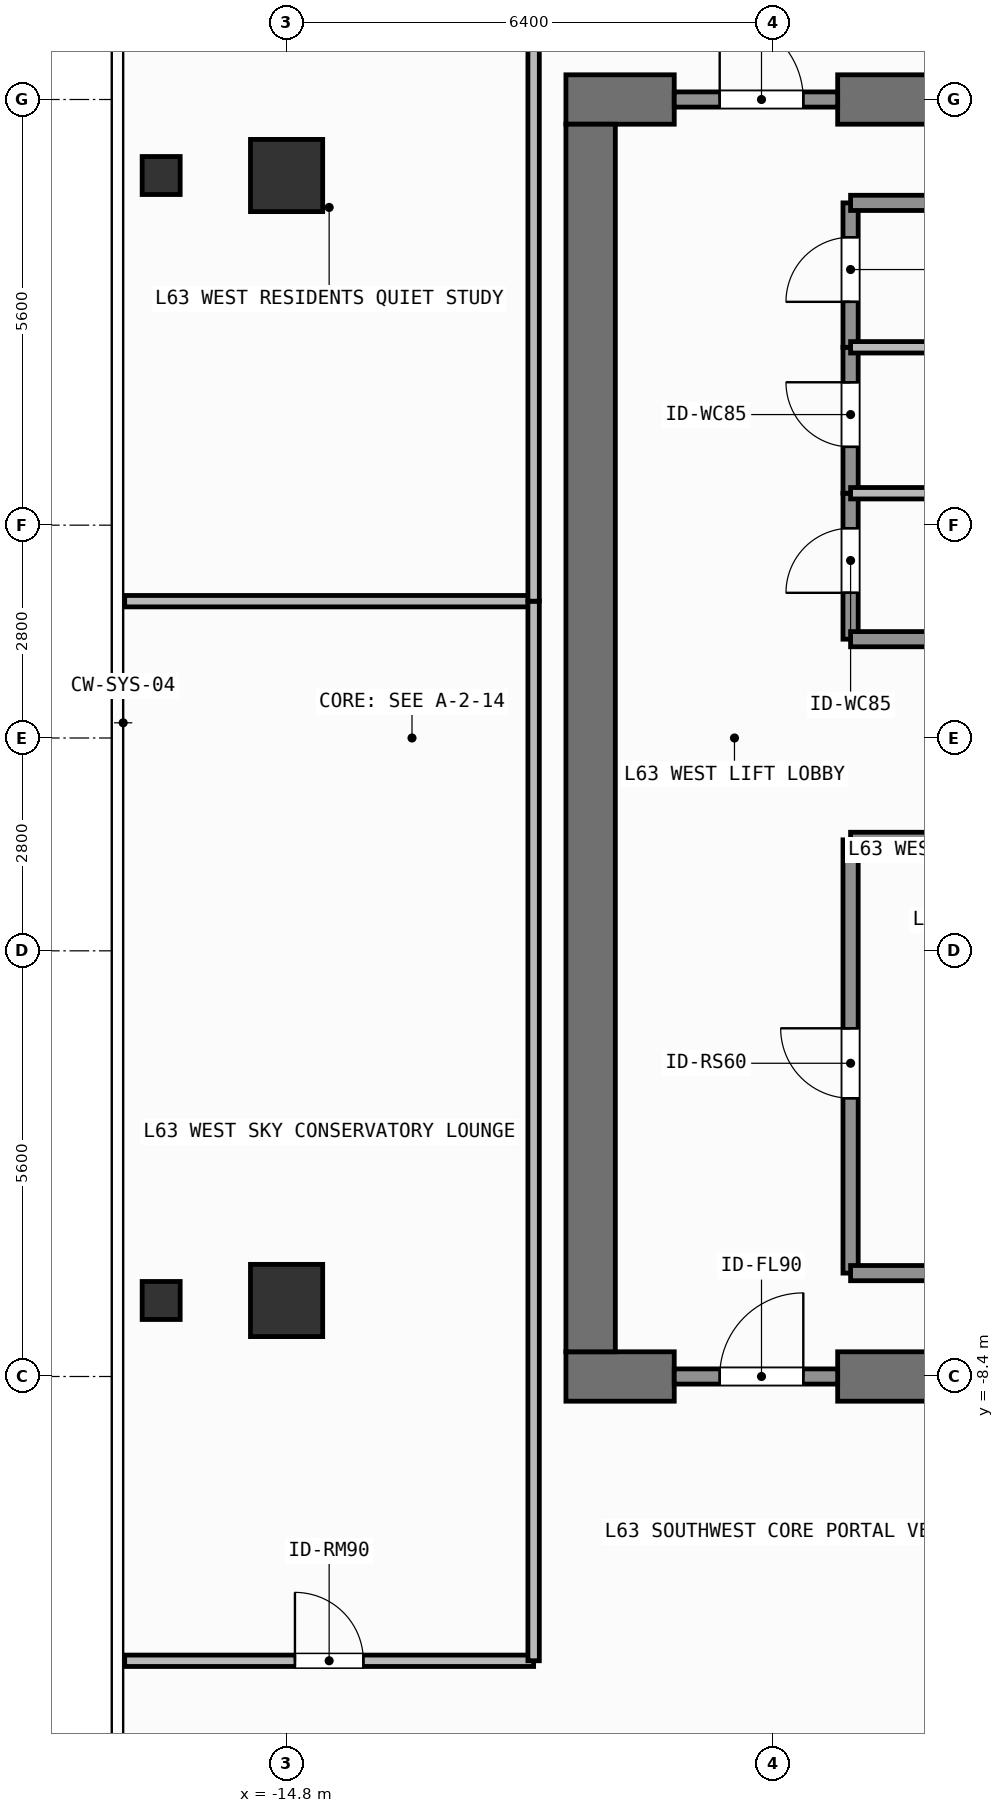
"""IFC4 building model, lengths in metres.
Left out: names, types, materials, properties, quantities, classifications, styles, units other than length and angle.
Written with IfcOpenShell. Run it as: python <this file> out.ifc"""

import sys

from ifc_helpers import new_model, si_unit, direction, frame, frame_2d, origin, origin_2d, place, context, subcontext, project, spatial, rectangle, hollow_rectangle, extrude, element, fill, save


model = new_model("IFC4")
c1 = context("Model", 3, precision=1e-05, world=origin(), true_north=direction((0.0, 1.0)))
c2 = subcontext(c1, "Body", "Model", "MODEL_VIEW")
j1 = project(units=[si_unit("LENGTHUNIT", "METRE"), si_unit("PLANEANGLEUNIT", "RADIAN")], contexts=[c1])
p1 = place(None, origin())
s1 = spatial("IfcSite", under=j1, at=p1, CompositionType="ELEMENT")
p2 = place(p1, origin())
s2 = spatial("IfcBuilding", under=s1, at=p2, CompositionType="ELEMENT")
p3 = place(p2, frame((0.0, 0.0, 258.6)))
s3 = spatial("IfcBuildingStorey", under=s2, at=p3, CompositionType="ELEMENT", Elevation=258.6)
p4 = place(p3, frame((-11.125, -8.4, 0.0), z_axis=(0.0, 0.0, 1.0), x_axis=(1.0, 0.0, 0.0)))
e1 = element("IfcWall", 1, at=p4, inside=s3, PredefinedType="SHEAR", context=c2, shape_type="SweptSolid", body=[
    extrude(rectangle(XDim=1.425, YDim=0.65, at=frame_2d((0.712, 0.0))), origin(), (0.0, 0.0, 1.0), 3.9),
])
p5 = place(p3, frame((-7.55, -8.4, 0.0), z_axis=(0.0, 0.0, 1.0), x_axis=(1.0, 0.0, 0.0)))
e2 = element("IfcWall", 2, at=p5, inside=s3, PredefinedType="SHEAR", context=c2, shape_type="SweptSolid", body=[
    extrude(rectangle(XDim=3.35, YDim=0.65, at=frame_2d((1.675, 0.0))), origin(), (0.0, 0.0, 1.0), 3.9),
])
p6 = place(p3, frame((-11.125, 8.4, 0.0), z_axis=(0.0, 0.0, 1.0), x_axis=(1.0, 0.0, 0.0)))
e3 = element("IfcWall", 3, at=p6, inside=s3, PredefinedType="SHEAR", context=c2, shape_type="SweptSolid", body=[
    extrude(rectangle(XDim=1.425, YDim=0.65, at=frame_2d((0.712, 0.0))), origin(), (0.0, 0.0, 1.0), 3.9),
])
p7 = place(p3, frame((-7.55, 8.4, 0.0), z_axis=(0.0, 0.0, 1.0), x_axis=(1.0, 0.0, 0.0)))
e4 = element("IfcWall", 4, at=p7, inside=s3, PredefinedType="SHEAR", context=c2, shape_type="SweptSolid", body=[
    extrude(rectangle(XDim=16.275, YDim=0.65, at=frame_2d((8.138, 0.0))), origin(), (0.0, 0.0, 1.0), 3.9),
])
p8 = place(p3, frame((-10.8, -8.075, 0.0), z_axis=(0.0, 0.0, 1.0), x_axis=(0.0, 1.0, 0.0)))
e5 = element("IfcWall", 5, at=p8, inside=s3, PredefinedType="SHEAR", context=c2, shape_type="SweptSolid", body=[
    extrude(rectangle(XDim=16.15, YDim=0.65, at=frame_2d((8.075, 0.0))), origin(), (0.0, 0.0, 1.0), 3.9),
])
for number, where, z_axis, x_axis in (
    (6, (-14.8, -7.4, 0.0), (0.0, 0.0, 1.0), (1.0, 0.0, 0.0)),
    (7, (-14.8, 7.4, 0.0), (0.0, 0.0, 1.0), (1.0, 0.0, 0.0)),
):
    element("IfcColumn", number, at=place(p3, frame(where, z_axis=z_axis, x_axis=x_axis)), inside=s3, PredefinedType="COLUMN", context=c2, shape_type="SweptSolid", body=[
        extrude(rectangle(XDim=0.95, YDim=0.95, at=origin_2d()), origin(), (0.0, 0.0, 1.0), 3.9),
    ])
for number, where, z_axis, x_axis in (
    (8, (-16.45, -7.4, 0.0), (0.0, 0.0, 1.0), (1.0, 0.0, 0.0)),
    (9, (-16.45, 7.4, 0.0), (0.0, 0.0, 1.0), (1.0, 0.0, 0.0)),
):
    element("IfcColumn", number, at=place(p3, frame(where, z_axis=z_axis, x_axis=x_axis)), inside=s3, PredefinedType="COLUMN", context=c2, shape_type="SweptSolid", body=[
        extrude(hollow_rectangle(XDim=0.5, YDim=0.5, WallThickness=0.025, at=origin_2d()), origin(), (0.0, 0.0, 1.0), 3.9),
    ])
p9 = place(p3, frame((-9.7, -8.4, 0.0), z_axis=(0.0, 0.0, 1.0), x_axis=(1.0, 0.0, 0.0)))
e10 = element("IfcWall", 10, at=p9, inside=s3, PredefinedType="SOLIDWALL", context=c2, shape_type="SweptSolid", body=[
    extrude(rectangle(XDim=2.15, YDim=0.2, at=frame_2d((1.075, 0.0))), origin(), (0.0, 0.0, 1.0), 2.92),
])
p10 = place(p9, frame((0.598, 0.0, 0.0)))
e11 = element("IfcOpeningElement", 11, at=p10, cuts=e10, PredefinedType="OPENING", context=c2, shape_type="SweptSolid", body=[
    extrude(rectangle(XDim=1.1, YDim=2.15, at=frame_2d((0.55, 1.075))), frame((0.0, 0.11, 0.0), z_axis=(0.0, -1.0, 0.0), x_axis=(1.0, 0.0, 0.0)), (0.0, 0.0, 1.0), 0.22),
])
p11 = place(p3, frame((-9.7, 8.4, 0.0), z_axis=(0.0, 0.0, 1.0), x_axis=(1.0, 0.0, 0.0)))
e12 = element("IfcWall", 12, at=p11, inside=s3, PredefinedType="SOLIDWALL", context=c2, shape_type="SweptSolid", body=[
    extrude(rectangle(XDim=2.15, YDim=0.2, at=frame_2d((1.075, 0.0))), origin(), (0.0, 0.0, 1.0), 2.92),
])
p12 = place(p11, frame((0.598, 0.0, 0.0)))
e13 = element("IfcOpeningElement", 13, at=p12, cuts=e12, PredefinedType="OPENING", context=c2, shape_type="SweptSolid", body=[
    extrude(rectangle(XDim=1.1, YDim=2.15, at=frame_2d((0.55, 1.075))), frame((0.0, 0.11, 0.0), z_axis=(0.0, -1.0, 0.0), x_axis=(1.0, 0.0, 0.0)), (0.0, 0.0, 1.0), 0.22),
])
p13 = place(p3, frame((-7.38, -7.04, 0.0), z_axis=(0.0, 0.0, 1.0), x_axis=(0.0, 1.0, 0.0)))
e14 = element("IfcWall", 14, at=p13, inside=s3, PredefinedType="SOLIDWALL", context=c2, shape_type="SweptSolid", body=[
    extrude(rectangle(XDim=5.7, YDim=0.2, at=frame_2d((2.85, 0.0))), origin(), (0.0, 0.0, 1.0), 3.68),
])
p14 = place(p13, frame((2.301, 0.0, 0.0)))
e15 = element("IfcOpeningElement", 15, at=p14, cuts=e14, PredefinedType="OPENING", context=c2, shape_type="SweptSolid", body=[
    extrude(rectangle(XDim=0.92, YDim=2.1, at=frame_2d((0.46, 1.05))), frame((0.0, 0.11, 0.0), z_axis=(0.0, -1.0, 0.0), x_axis=(1.0, 0.0, 0.0)), (0.0, 0.0, 1.0), 0.22),
])
p15 = place(p3, frame((-7.38, 1.3, 0.0), z_axis=(0.0, 0.0, 1.0), x_axis=(0.0, 1.0, 0.0)))
e16 = element("IfcWall", 16, at=p15, inside=s3, PredefinedType="SOLIDWALL", context=c2, shape_type="SweptSolid", body=[
    extrude(rectangle(XDim=1.92, YDim=0.2, at=frame_2d((0.96, 0.0))), origin(), (0.0, 0.0, 1.0), 3.68),
])
p16 = place(p15, frame((0.61, 0.0, 0.0)))
e17 = element("IfcOpeningElement", 17, at=p16, cuts=e16, PredefinedType="OPENING", context=c2, shape_type="SweptSolid", body=[
    extrude(rectangle(XDim=0.85, YDim=2.1, at=frame_2d((0.425, 1.05))), frame((0.0, 0.11, 0.0), z_axis=(0.0, -1.0, 0.0), x_axis=(1.0, 0.0, 0.0)), (0.0, 0.0, 1.0), 0.22),
])
p17 = place(p3, frame((-7.38, 3.22, 0.0), z_axis=(0.0, 0.0, 1.0), x_axis=(0.0, 1.0, 0.0)))
e18 = element("IfcWall", 18, at=p17, inside=s3, PredefinedType="SOLIDWALL", context=c2, shape_type="SweptSolid", body=[
    extrude(rectangle(XDim=1.92, YDim=0.2, at=frame_2d((0.96, 0.0))), origin(), (0.0, 0.0, 1.0), 3.68),
])
p18 = place(p17, frame((0.61, 0.0, 0.0)))
e19 = element("IfcOpeningElement", 19, at=p18, cuts=e18, PredefinedType="OPENING", context=c2, shape_type="SweptSolid", body=[
    extrude(rectangle(XDim=0.85, YDim=2.1, at=frame_2d((0.425, 1.05))), frame((0.0, 0.11, 0.0), z_axis=(0.0, -1.0, 0.0), x_axis=(1.0, 0.0, 0.0)), (0.0, 0.0, 1.0), 0.22),
])
p19 = place(p3, frame((-7.38, 5.14, 0.0), z_axis=(0.0, 0.0, 1.0), x_axis=(0.0, 1.0, 0.0)))
e20 = element("IfcWall", 20, at=p19, inside=s3, PredefinedType="SOLIDWALL", context=c2, shape_type="SweptSolid", body=[
    extrude(rectangle(XDim=1.9, YDim=0.2, at=frame_2d((0.95, 0.0))), origin(), (0.0, 0.0, 1.0), 3.68),
])
p20 = place(p19, frame((0.598, 0.0, 0.0)))
e21 = element("IfcOpeningElement", 21, at=p20, cuts=e20, PredefinedType="OPENING", context=c2, shape_type="SweptSolid", body=[
    extrude(rectangle(XDim=0.85, YDim=2.1, at=frame_2d((0.425, 1.05))), frame((0.0, 0.11, 0.0), z_axis=(0.0, -1.0, 0.0), x_axis=(1.0, 0.0, 0.0)), (0.0, 0.0, 1.0), 0.22),
])
p21 = place(p3, frame((-16.93, -12.14, 0.0), z_axis=(0.0, 0.0, 1.0), x_axis=(1.0, 0.0, 0.0)))
e22 = element("IfcWall", 22, at=p21, inside=s3, PredefinedType="PARTITIONING", context=c2, shape_type="SweptSolid", body=[
    extrude(rectangle(XDim=5.38, YDim=0.15, at=frame_2d((2.69, 0.0))), origin(), (0.0, 0.0, 1.0), 3.68),
])
p22 = place(p21, frame((2.24, 0.0, 0.0)))
e23 = element("IfcOpeningElement", 23, at=p22, cuts=e22, PredefinedType="OPENING", context=c2, shape_type="SweptSolid", body=[
    extrude(rectangle(XDim=0.9, YDim=2.1, at=frame_2d((0.45, 1.05))), frame((0.0, 0.085, 0.0), z_axis=(0.0, -1.0, 0.0), x_axis=(1.0, 0.0, 0.0)), (0.0, 0.0, 1.0), 0.17),
])
for number, where, z_axis, x_axis in (
    (24, (-7.38, -1.34, 0.0), (0.0, 0.0, 1.0), (1.0, 0.0, 0.0)),
    (25, (-7.38, 1.3, 0.0), (0.0, 0.0, 1.0), (1.0, 0.0, 0.0)),
):
    element("IfcWall", number, at=place(p3, frame(where, z_axis=z_axis, x_axis=x_axis)), inside=s3, PredefinedType="SOLIDWALL", context=c2, shape_type="SweptSolid", body=[
        extrude(rectangle(XDim=6.24, YDim=0.2, at=frame_2d((3.12, 0.0))), origin(), (0.0, 0.0, 1.0), 3.68),
    ])
for number, where, z_axis, x_axis in (
    (26, (-7.38, -7.04, 0.0), (0.0, 0.0, 1.0), (1.0, 0.0, 0.0)),
    (27, (-7.38, 7.04, 0.0), (0.0, 0.0, 1.0), (1.0, 0.0, 0.0)),
):
    element("IfcWall", number, at=place(p3, frame(where, z_axis=z_axis, x_axis=x_axis)), inside=s3, PredefinedType="SOLIDWALL", context=c2, shape_type="SweptSolid", body=[
        extrude(rectangle(XDim=5.8, YDim=0.2, at=frame_2d((2.9, 0.0))), origin(), (0.0, 0.0, 1.0), 3.68),
    ])
for number, where, z_axis, x_axis in (
    (28, (-7.38, 3.22, 0.0), (0.0, 0.0, 1.0), (1.0, 0.0, 0.0)),
    (29, (-7.38, 5.14, 0.0), (0.0, 0.0, 1.0), (1.0, 0.0, 0.0)),
):
    element("IfcWall", number, at=place(p3, frame(where, z_axis=z_axis, x_axis=x_axis)), inside=s3, PredefinedType="PARTITIONING", context=c2, shape_type="SweptSolid", body=[
        extrude(rectangle(XDim=5.8, YDim=0.15, at=frame_2d((2.9, 0.0))), origin(), (0.0, 0.0, 1.0), 3.68),
    ])
p23 = place(p3, frame((-16.93, 1.8, 0.0), z_axis=(0.0, 0.0, 1.0), x_axis=(1.0, 0.0, 0.0)))
e30 = element("IfcWall", 30, at=p23, inside=s3, PredefinedType="PARTITIONING", context=c2, shape_type="SweptSolid", body=[
    extrude(rectangle(XDim=5.38, YDim=0.15, at=frame_2d((2.69, 0.0))), origin(), (0.0, 0.0, 1.0), 3.68),
])
p24 = place(p3, frame((-11.55, -12.14, 0.0), z_axis=(0.0, 0.0, 1.0), x_axis=(0.0, 1.0, 0.0)))
e31 = element("IfcWall", 31, at=p24, inside=s3, PredefinedType="PARTITIONING", context=c2, shape_type="SweptSolid", body=[
    extrude(rectangle(XDim=13.94, YDim=0.15, at=frame_2d((6.97, 0.0))), origin(), (0.0, 0.0, 1.0), 3.68),
])
p25 = place(p3, frame((-11.55, 1.8, 0.0), z_axis=(0.0, 0.0, 1.0), x_axis=(0.0, 1.0, 0.0)))
e32 = element("IfcWall", 32, at=p25, inside=s3, PredefinedType="PARTITIONING", context=c2, shape_type="SweptSolid", body=[
    extrude(rectangle(XDim=10.34, YDim=0.15, at=frame_2d((5.17, 0.0))), origin(), (0.0, 0.0, 1.0), 3.68),
])
p26 = place(p10, origin())
e33 = element("IfcDoor", 33, at=p26, inside=s3, OperationType="SINGLE_SWING_RIGHT", PredefinedType="DOOR", context=c2, shape_type="SweptSolid", body=[
    extrude(rectangle(XDim=1.1, YDim=2.15, at=frame_2d((0.55, 1.075))), frame((0.0, 0.025, 0.0), z_axis=(0.0, -1.0, 0.0), x_axis=(1.0, 0.0, 0.0)), (0.0, 0.0, 1.0), 0.05),
])
fill(e11, e33)
p27 = place(p12, origin())
e34 = element("IfcDoor", 34, at=p27, inside=s3, OperationType="SINGLE_SWING_LEFT", PredefinedType="DOOR", context=c2, shape_type="SweptSolid", body=[
    extrude(rectangle(XDim=1.1, YDim=2.15, at=frame_2d((0.55, 1.075))), frame((0.0, 0.025, 0.0), z_axis=(0.0, -1.0, 0.0), x_axis=(1.0, 0.0, 0.0)), (0.0, 0.0, 1.0), 0.05),
])
fill(e13, e34)
p28 = place(p14, origin())
e35 = element("IfcDoor", 35, at=p28, inside=s3, OperationType="SINGLE_SWING_RIGHT", PredefinedType="DOOR", context=c2, shape_type="SweptSolid", body=[
    extrude(rectangle(XDim=0.92, YDim=2.1, at=frame_2d((0.46, 1.05))), frame((0.0, 0.025, 0.0), z_axis=(0.0, -1.0, 0.0), x_axis=(1.0, 0.0, 0.0)), (0.0, 0.0, 1.0), 0.05),
])
fill(e15, e35)
p29 = place(p16, origin())
e36 = element("IfcDoor", 36, at=p29, inside=s3, OperationType="SINGLE_SWING_LEFT", PredefinedType="DOOR", context=c2, shape_type="SweptSolid", body=[
    extrude(rectangle(XDim=0.85, YDim=2.1, at=frame_2d((0.425, 1.05))), frame((0.0, 0.025, 0.0), z_axis=(0.0, -1.0, 0.0), x_axis=(1.0, 0.0, 0.0)), (0.0, 0.0, 1.0), 0.05),
])
fill(e17, e36)
p30 = place(p18, origin())
e37 = element("IfcDoor", 37, at=p30, inside=s3, OperationType="SINGLE_SWING_RIGHT", PredefinedType="DOOR", context=c2, shape_type="SweptSolid", body=[
    extrude(rectangle(XDim=0.85, YDim=2.1, at=frame_2d((0.425, 1.05))), frame((0.0, 0.025, 0.0), z_axis=(0.0, -1.0, 0.0), x_axis=(1.0, 0.0, 0.0)), (0.0, 0.0, 1.0), 0.05),
])
fill(e19, e37)
p31 = place(p20, origin())
e38 = element("IfcDoor", 38, at=p31, inside=s3, OperationType="SINGLE_SWING_LEFT", PredefinedType="DOOR", context=c2, shape_type="SweptSolid", body=[
    extrude(rectangle(XDim=0.85, YDim=2.1, at=frame_2d((0.425, 1.05))), frame((0.0, 0.025, 0.0), z_axis=(0.0, -1.0, 0.0), x_axis=(1.0, 0.0, 0.0)), (0.0, 0.0, 1.0), 0.05),
])
fill(e21, e38)
p32 = place(p22, origin())
e39 = element("IfcDoor", 39, at=p32, inside=s3, OperationType="SINGLE_SWING_LEFT", PredefinedType="DOOR", context=c2, shape_type="SweptSolid", body=[
    extrude(rectangle(XDim=0.9, YDim=2.1, at=frame_2d((0.45, 1.05))), frame((0.0, 0.025, 0.0), z_axis=(0.0, -1.0, 0.0), x_axis=(1.0, 0.0, 0.0)), (0.0, 0.0, 1.0), 0.05),
])
fill(e23, e39)
save(model, sys.argv[1])
